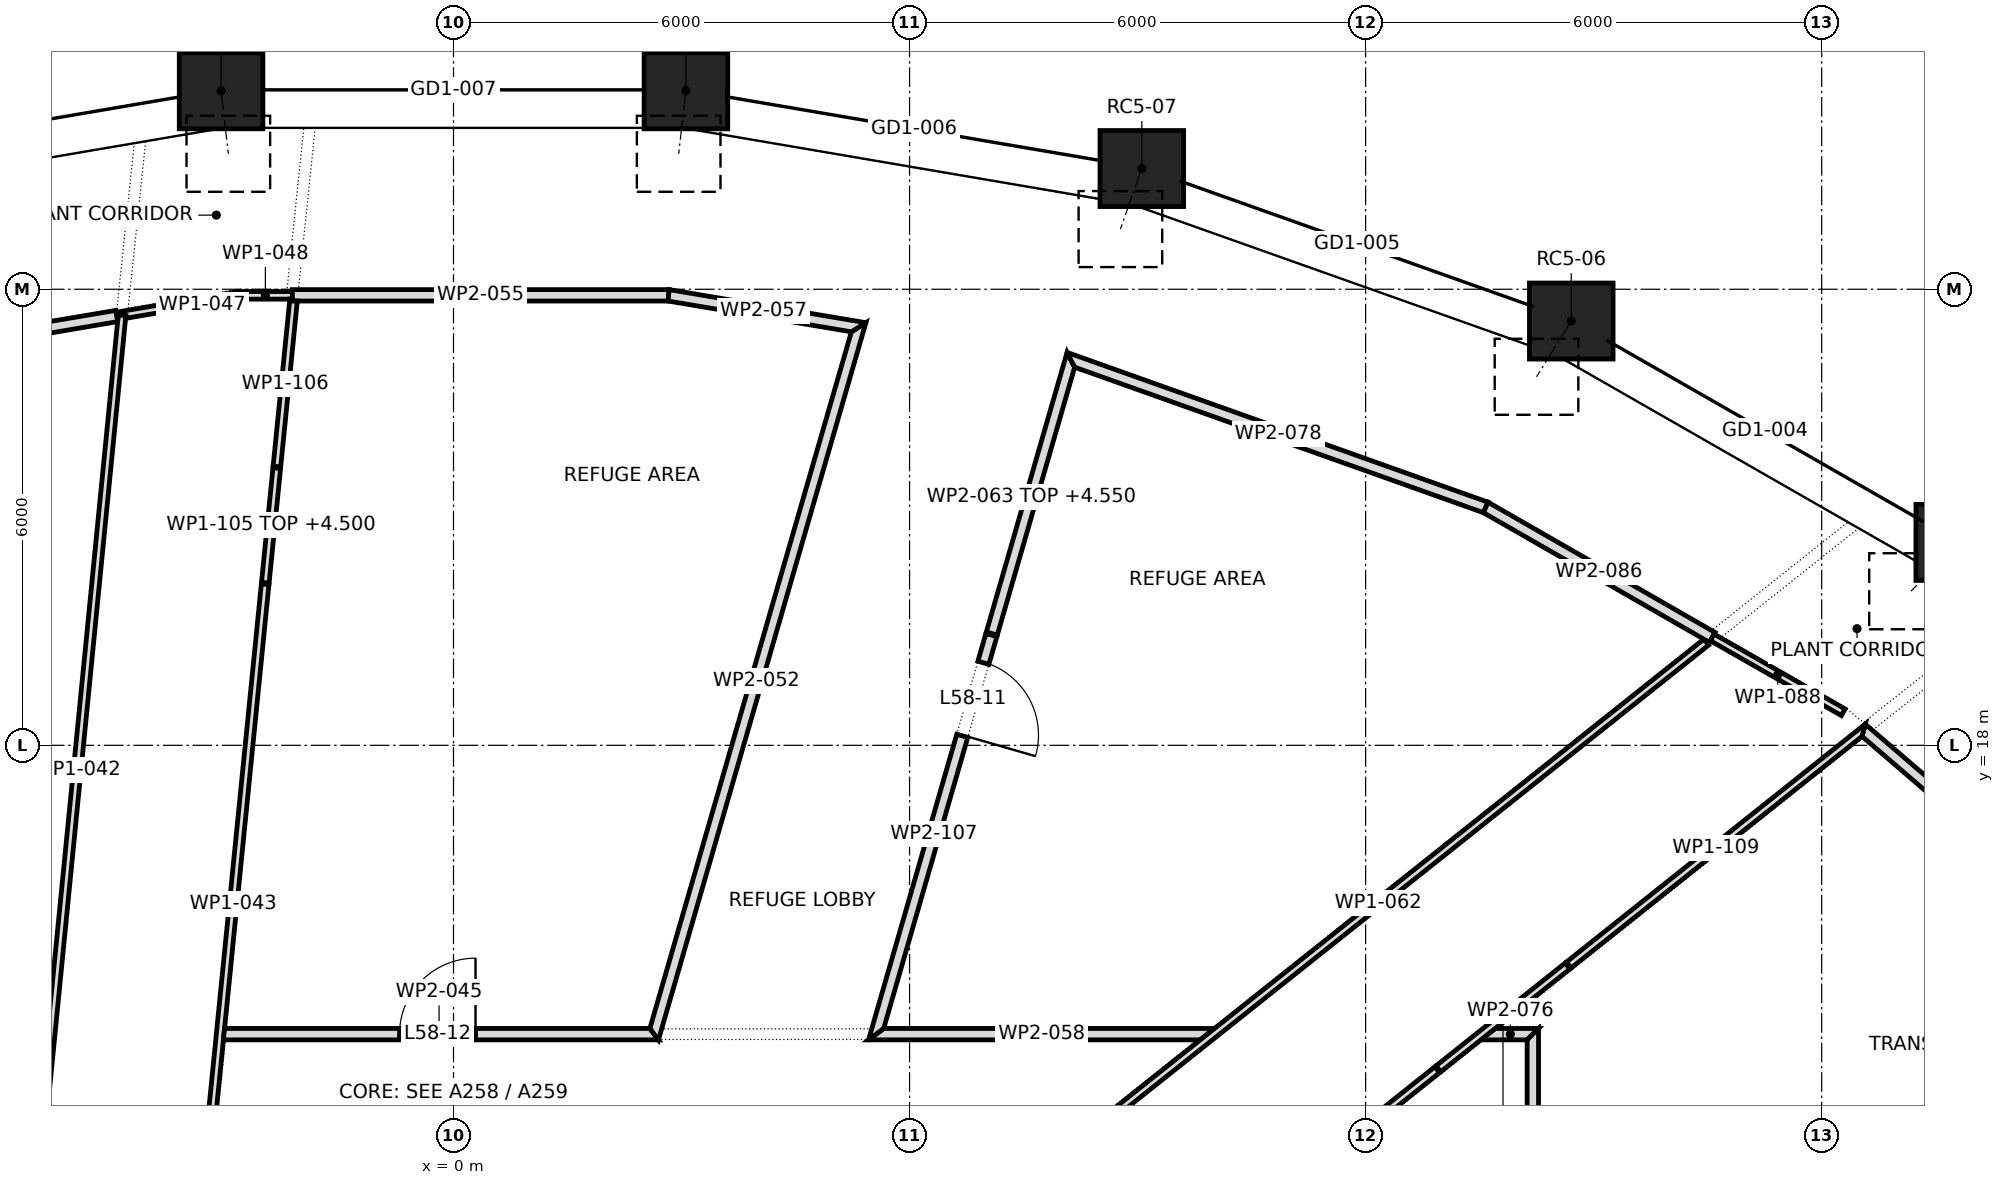
"""IFC4 building model, lengths in metres.
Left out: names, types, materials, properties, quantities, classifications, styles, units other than length and angle.
Written with IfcOpenShell. Run it as: python <this file> out.ifc"""

import sys

from ifc_helpers import new_model, si_unit, direction, frame, frame_2d, origin, origin_2d, place, context, subcontext, project, spatial, polyline, rectangle, outline, extrude, element, fill, save


model = new_model("IFC4")
c1 = context("Model", 3, precision=1e-05, world=origin(), true_north=direction((0.0, 1.0)))
c2 = subcontext(c1, "Body", "Model", "MODEL_VIEW")
j1 = project(units=[si_unit("LENGTHUNIT", "METRE"), si_unit("PLANEANGLEUNIT", "RADIAN")], contexts=[c1])
p1 = place(None, origin())
s1 = spatial("IfcSite", under=j1, at=p1, CompositionType="ELEMENT")
p2 = place(p1, origin())
s2 = spatial("IfcBuilding", under=s1, at=p2, CompositionType="ELEMENT")
p3 = place(p2, frame((0.0, 0.0, 250.9)))
s3 = spatial("IfcBuildingStorey", under=s2, at=p3, CompositionType="ELEMENT", Elevation=250.9)
p4 = place(p3, frame((19.79, 20.669, 0.083), z_axis=(-0.115812481815, -0.12096379157, 0.985877898213), x_axis=(0.722319686129, -0.691559304059, 0.0)))
e1 = element("IfcColumn", 1, at=p4, inside=s3, PredefinedType="COLUMN", context=c2, shape_type="SweptSolid", body=[
    extrude(rectangle(XDim=1.1, YDim=1.0, at=origin_2d()), origin(), (0.0, 0.0, 1.0), 5.308),
])
p5 = place(p3, frame((14.705, 23.582, 0.081), z_axis=(-0.086092626008, -0.138152910538, 0.986661964939), x_axis=(0.848695936688, -0.528881089707, 0.0)))
e2 = element("IfcColumn", 2, at=p5, inside=s3, PredefinedType="COLUMN", context=c2, shape_type="SweptSolid", body=[
    extrude(rectangle(XDim=1.1, YDim=1.0, at=origin_2d()), origin(), (0.0, 0.0, 1.0), 5.309),
])
p6 = place(p3, frame((9.056, 25.588, 0.079), z_axis=(-0.053067495482, -0.149959361151, 0.987266950184), x_axis=(0.942712482292, -0.333606318481, 0.0)))
e3 = element("IfcColumn", 3, at=p6, inside=s3, PredefinedType="COLUMN", context=c2, shape_type="SweptSolid", body=[
    extrude(rectangle(XDim=1.1, YDim=1.0, at=origin_2d()), origin(), (0.0, 0.0, 1.0), 5.309),
])
for number, where, z_axis, x_axis in (
    (4, (3.058, 26.611, 0.078), (-0.018, -0.156, 0.988), (0.993, -0.115, 0.0)),
    (5, (-3.058, 26.611, 0.078), (0.018, -0.156, 0.988), (0.993, 0.115, 0.0)),
):
    element("IfcColumn", number, at=place(p3, frame(where, z_axis=z_axis, x_axis=x_axis)), inside=s3, PredefinedType="COLUMN", context=c2, shape_type="SweptSolid", body=[
        extrude(rectangle(XDim=1.1, YDim=1.0, at=origin_2d()), origin(), (0.0, 0.0, 1.0), 5.309),
    ])
p7 = place(p3, frame((-8.386, 22.979, 0.0), z_axis=(0.0, 0.0, 1.0), x_axis=(0.986003200339, 0.166726389397, 0.0)))
e6 = element("IfcWall", 6, at=p7, inside=s3, PredefinedType="PARTITIONING", context=c2, shape_type="SweptSolid", body=[
    extrude(outline(polyline([(0.0, 0.075), (0.0, 0.074), (0.013, -0.075), (1.347, -0.075), (2.68, -0.075), (4.014, -0.075), (4.014, 0.075), (2.676, 0.075), (1.338, 0.075), (0.0, 0.075)])), origin(), (0.0, 0.0, 1.0), 5.1),
])
p8 = place(p7, frame((1.545, 0.0, 0.0)))
e7 = element("IfcOpeningElement", 7, at=p8, cuts=e6, PredefinedType="OPENING", context=c2, shape_type="SweptSolid", body=[
    extrude(rectangle(XDim=1.0, YDim=2.1, at=frame_2d((0.5, 1.05))), frame((0.0, 0.087, 0.0), z_axis=(0.0, -1.0, 0.0), x_axis=(1.0, 0.0, 0.0)), (0.0, 0.0, 1.0), 0.174),
])
p9 = place(p3, frame((-5.54, 11.7, 0.0), z_axis=(0.0, 0.0, 1.0), x_axis=(0.098192347243, 0.995167454725, 0.0)))
e8 = element("IfcWall", 8, at=p9, inside=s3, PredefinedType="PARTITIONING", context=c2, shape_type="SweptSolid", body=[
    extrude(rectangle(XDim=12.019, YDim=0.1, at=frame_2d((6.01, 0.0))), origin(), (0.0, 0.0, 1.0), 5.1),
])
p10 = place(p3, frame((-3.32, 11.7, 0.0), z_axis=(0.0, 0.0, 1.0), x_axis=(0.0995179867, 0.995035763339, 0.0)))
e9 = element("IfcWall", 9, at=p10, inside=s3, PredefinedType="PARTITIONING", context=c2, shape_type="SweptSolid", body=[
    extrude(outline(polyline([(0.0, -0.05), (1.295, -0.05), (2.59, -0.05), (2.593, -0.05), (2.593, -0.05), (4.552, -0.05), (6.512, -0.05), (8.471, -0.05), (8.471, 0.05), (6.777, 0.05), (5.083, 0.05), (3.388, 0.05), (1.694, 0.05), (0.0, 0.05), (0.0, -0.05)])), origin(), (0.0, 0.0, 1.0), 5.1),
])
p11 = place(p3, frame((-3.027, 14.2, 0.0), z_axis=(0.0, 0.0, 1.0), x_axis=(1.0, 0.0, 0.0)))
e10 = element("IfcWall", 10, at=p11, inside=s3, PredefinedType="PARTITIONING", context=c2, shape_type="SweptSolid", body=[
    extrude(outline(polyline([(5.723, -0.075), (5.723, -0.075), (5.667, 0.0), (5.611, 0.075), (3.745, 0.075), (1.88, 0.075), (0.015, 0.075), (0.0, -0.073), (0.0, -0.075), (1.908, -0.075), (3.816, -0.075), (5.723, -0.075)])), origin(), (0.0, 0.0, 1.0), 5.1),
])
p12 = place(p11, frame((2.317, 0.0, 0.0)))
e11 = element("IfcOpeningElement", 11, at=p12, cuts=e10, PredefinedType="OPENING", context=c2, shape_type="SweptSolid", body=[
    extrude(rectangle(XDim=1.0, YDim=2.1, at=frame_2d((0.5, 1.05))), frame((0.0, 0.087, 0.0), z_axis=(0.0, -1.0, 0.0), x_axis=(1.0, 0.0, 0.0)), (0.0, 0.0, 1.0), 0.174),
])
p13 = place(p3, frame((-2.826, 23.921, 0.0), z_axis=(0.0, 0.0, 1.0), x_axis=(-0.985865518692, -0.167538589746, 0.0)))
e12 = element("IfcWall", 12, at=p13, inside=s3, PredefinedType="PARTITIONING", context=c2, shape_type="SweptSolid", body=[
    extrude(outline(polyline([(1.626, 0.05), (1.622, 0.05), (1.604, -0.014), (1.508, 0.012), (1.518, 0.05), (0.009, 0.05), (0.009, 0.05), (0.009, 0.05), (0.004, 0.0), (0.0, -0.05), (1.626, -0.05), (1.626, 0.05)])), origin(), (0.0, 0.0, 1.0), 5.1),
])
p14 = place(p3, frame((-2.12, 23.92, 0.0), z_axis=(0.0, 0.0, 1.0), x_axis=(-1.0, 0.0, 0.0)))
e13 = element("IfcWall", 13, at=p14, inside=s3, PredefinedType="PARTITIONING", context=c2, shape_type="SweptSolid", body=[
    extrude(outline(polyline([(0.0, -0.05), (0.714, -0.05), (0.706, 0.05), (0.0, 0.05), (0.0, -0.05)])), origin(), (0.0, 0.0, 1.0), 5.1),
])
p15 = place(p3, frame((2.624, 14.146, 0.0), z_axis=(0.0, 0.0, 1.0), x_axis=(0.277874591474, 0.960617359521, 0.0)))
e14 = element("IfcWall", 14, at=p15, inside=s3, PredefinedType="PARTITIONING", context=c2, shape_type="SweptSolid", body=[
    extrude(outline(polyline([(9.822, -0.075), (9.822, -0.075), (9.654, 0.075), (7.746, 0.075), (5.837, 0.075), (3.929, 0.075), (2.021, 0.075), (0.113, 0.075), (0.0, -0.075), (1.965, -0.075), (3.929, -0.075), (5.893, -0.075), (7.857, -0.075), (9.822, -0.075)])), origin(), (0.0, 0.0, 1.0), 5.1),
])
p16 = place(p3, frame((2.836, 23.92, 0.0), z_axis=(0.0, 0.0, 1.0), x_axis=(-1.0, 0.0, 0.0)))
e15 = element("IfcWall", 15, at=p16, inside=s3, PredefinedType="PARTITIONING", context=c2, shape_type="SweptSolid", body=[
    extrude(outline(polyline([(4.956, 0.075), (3.308, 0.075), (1.66, 0.075), (0.012, 0.075), (0.0, -0.074), (0.0, -0.075), (1.652, -0.075), (3.304, -0.075), (4.956, -0.075), (4.956, 0.075)])), origin(), (0.0, 0.0, 1.0), 5.1),
])
p17 = place(p3, frame((5.413, 23.486, 0.0), z_axis=(0.0, 0.0, 1.0), x_axis=(-0.986192138968, 0.165605147982, 0.0)))
e16 = element("IfcWall", 16, at=p17, inside=s3, PredefinedType="PARTITIONING", context=c2, shape_type="SweptSolid", body=[
    extrude(outline(polyline([(2.625, -0.075), (2.625, -0.075), (2.613, 0.075), (0.168, 0.075), (0.0, -0.075), (1.313, -0.075), (2.625, -0.075)])), origin(), (0.0, 0.0, 1.0), 5.1),
])
p18 = place(p3, frame((5.46, 14.2, 0.0), z_axis=(0.0, 0.0, 1.0), x_axis=(1.0, 0.0, 0.0)))
e17 = element("IfcWall", 17, at=p18, inside=s3, PredefinedType="PARTITIONING", context=c2, shape_type="SweptSolid", body=[
    extrude(outline(polyline([(0.0, -0.075), (1.455, -0.075), (2.91, -0.075), (4.365, -0.075), (4.553, 0.075), (3.102, 0.075), (1.651, 0.075), (0.199, 0.075), (0.1, 0.0), (0.0, -0.075)])), origin(), (0.0, 0.0, 1.0), 5.1),
])
p19 = place(p3, frame((7.811, 12.459, 0.0), z_axis=(0.0, 0.0, 1.0), x_axis=(0.782532006264, 0.622610359031, 0.0)))
e18 = element("IfcWall", 18, at=p19, inside=s3, PredefinedType="PARTITIONING", context=c2, shape_type="SweptSolid", body=[
    extrude(outline(polyline([(11.08, 0.05), (9.234, 0.05), (7.387, 0.05), (5.54, 0.05), (3.694, 0.05), (1.847, 0.05), (0.0, 0.05), (0.1, -0.05), (1.93, -0.05), (3.76, -0.05), (5.59, -0.05), (7.42, -0.05), (9.25, -0.05), (11.08, -0.05), (11.08, 0.05)])), origin(), (0.0, 0.0, 1.0), 5.1),
])
p20 = place(p3, frame((8.144, 23.148, 0.0), z_axis=(0.0, 0.0, 1.0), x_axis=(-0.277458764532, -0.96073754688, 0.0)))
e19 = element("IfcWall", 19, at=p20, inside=s3, PredefinedType="PARTITIONING", context=c2, shape_type="SweptSolid", body=[
    extrude(outline(polyline([(3.838, 0.075), (1.999, 0.075), (0.159, 0.075), (0.0, -0.075), (1.919, -0.075), (3.838, -0.075), (3.838, 0.075)])), origin(), (0.0, 0.0, 1.0), 4.55),
])
p21 = place(p3, frame((10.39, 11.7, 0.0), z_axis=(0.0, 0.0, 1.0), x_axis=(0.782322562036, 0.622873509574, 0.0)))
e20 = element("IfcWall", 20, at=p21, inside=s3, PredefinedType="PARTITIONING", context=c2, shape_type="SweptSolid", body=[
    extrude(outline(polyline([(0.0, 0.05), (0.0, -0.05), (1.636, -0.05), (3.272, -0.05), (3.272, 0.05), (1.636, 0.05), (0.0, 0.05)])), origin(), (0.0, 0.0, 1.0), 5.1),
])
p22 = place(p3, frame((13.516, 14.2, 0.0), z_axis=(0.0, 0.0, 1.0), x_axis=(1.0, 0.0, 0.0)))
e21 = element("IfcWall", 21, at=p22, inside=s3, PredefinedType="PARTITIONING", context=c2, shape_type="SweptSolid", body=[
    extrude(outline(polyline([(0.0, -0.075), (0.609, -0.075), (0.759, 0.075), (0.188, 0.075), (0.0, -0.075), (0.0, -0.075)])), origin(), (0.0, 0.0, 1.0), 5.1),
])
p23 = place(p3, frame((13.586, 21.128, 0.0), z_axis=(0.0, 0.0, 1.0), x_axis=(-0.942147093133, 0.335199723897, 0.0)))
e22 = element("IfcWall", 22, at=p23, inside=s3, PredefinedType="PARTITIONING", context=c2, shape_type="SweptSolid", body=[
    extrude(outline(polyline([(5.879, -0.075), (5.879, -0.075), (5.72, 0.075), (3.818, 0.075), (1.916, 0.075), (0.013, 0.075), (0.0, -0.073), (0.0, -0.075), (1.96, -0.075), (3.919, -0.075), (5.879, -0.075)])), origin(), (0.0, 0.0, 1.0), 5.1),
])
p24 = place(p3, frame((14.091, 8.665, 0.0), z_axis=(0.0, 0.0, 1.0), x_axis=(0.892879606884, 0.45029546701, 0.0)))
e23 = element("IfcWall", 23, at=p24, inside=s3, PredefinedType="PARTITIONING", context=c2, shape_type="SweptSolid", body=[
    extrude(outline(polyline([(10.606, -0.075), (10.606, -0.075), (10.424, 0.075), (8.727, 0.075), (7.031, 0.075), (5.334, 0.075), (3.637, 0.075), (1.94, 0.075), (0.243, 0.075), (0.0, -0.075), (0.0, -0.075), (1.768, -0.075), (3.535, -0.075), (5.303, -0.075), (7.071, -0.075), (8.838, -0.075), (10.606, -0.075)])), origin(), (0.0, 0.0, 1.0), 5.1),
])
p25 = place(p3, frame((14.2, 14.275, 0.0), z_axis=(0.0, 0.0, 1.0), x_axis=(0.0, -1.0, 0.0)))
e24 = element("IfcWall", 24, at=p25, inside=s3, PredefinedType="PARTITIONING", context=c2, shape_type="SweptSolid", body=[
    extrude(outline(polyline([(0.15, -0.075), (1.992, -0.075), (3.834, -0.075), (5.677, -0.075), (5.433, 0.075), (3.622, 0.075), (1.811, 0.075), (0.0, 0.075), (0.15, -0.075)])), origin(), (0.0, 0.0, 1.0), 5.1),
])
p26 = place(p25, frame((2.315, 0.0, 0.0)))
e25 = element("IfcOpeningElement", 25, at=p26, cuts=e24, PredefinedType="OPENING", context=c2, shape_type="SweptSolid", body=[
    extrude(rectangle(XDim=1.0, YDim=2.1, at=frame_2d((0.5, 1.05))), frame((0.0, 0.087, 0.0), z_axis=(0.0, -1.0, 0.0), x_axis=(1.0, 0.0, 0.0)), (0.0, 0.0, 1.0), 0.174),
])
p27 = place(p3, frame((16.56, 19.42, 0.0), z_axis=(0.0, 0.0, 1.0), x_axis=(-0.867342678507, 0.497711440536, 0.0)))
e26 = element("IfcWall", 26, at=p27, inside=s3, PredefinedType="PARTITIONING", context=c2, shape_type="SweptSolid", body=[
    extrude(outline(polyline([(0.0, -0.075), (1.721, -0.075), (3.443, -0.075), (3.429, 0.075), (1.715, 0.075), (0.0, 0.075), (0.0, -0.075)])), origin(), (0.0, 0.0, 1.0), 5.1),
])
p28 = place(p3, frame((18.283, 18.435, 0.0), z_axis=(0.0, 0.0, 1.0), x_axis=(-0.868280986798, 0.496072704314, 0.0)))
e27 = element("IfcWall", 27, at=p28, inside=s3, PredefinedType="PARTITIONING", context=c2, shape_type="SweptSolid", body=[
    extrude(rectangle(XDim=1.985, YDim=0.1, at=frame_2d((0.992, 0.0))), origin(), (0.0, 0.0, 1.0), 5.1),
])
p29 = place(p3, frame((22.166, 15.095, 0.0), z_axis=(0.0, 0.0, 1.0), x_axis=(-0.758681846791, 0.651461322989, 0.0)))
e28 = element("IfcWall", 28, at=p29, inside=s3, PredefinedType="PARTITIONING", context=c2, shape_type="SweptSolid", body=[
    extrude(outline(polyline([(4.8, -0.075), (4.8, -0.075), (4.727, 0.075), (3.156, 0.075), (1.586, 0.075), (0.015, 0.075), (0.0, -0.074), (0.0, -0.075), (1.6, -0.075), (3.2, -0.075), (4.8, -0.075)])), origin(), (0.0, 0.0, 1.0), 5.1),
])
p30 = place(p3, frame((-2.477, 20.129, 0.0), z_axis=(0.0, 0.0, 1.0), x_axis=(0.099535204501, 0.995034041159, 0.0)))
e29 = element("IfcWall", 29, at=p30, inside=s3, PredefinedType="PARTITIONING", context=c2, shape_type="SweptSolid", body=[
    extrude(outline(polyline([(0.0, 0.05), (0.0, -0.05), (1.535, -0.05), (1.535, 0.05), (0.0, 0.05)])), origin(), (0.0, 0.0, 1.0), 4.5),
])
p31 = place(p3, frame((-2.324, 21.657, 0.0), z_axis=(0.0, 0.0, 1.0), x_axis=(0.099471035503, 0.99504045802, 0.0)))
e30 = element("IfcWall", 30, at=p31, inside=s3, PredefinedType="PARTITIONING", context=c2, shape_type="SweptSolid", body=[
    extrude(outline(polyline([(0.0, -0.05), (2.204, -0.05), (2.198, 0.014), (2.219, 0.017), (2.219, 0.05), (0.0, 0.05), (0.0, -0.05)])), origin(), (0.0, 0.0, 1.0), 5.1),
])
p32 = place(p3, frame((7.079, 19.461, 0.0), z_axis=(0.0, 0.0, 1.0), x_axis=(-0.277490255222, -0.960728451883, 0.0)))
e31 = element("IfcWall", 31, at=p32, inside=s3, PredefinedType="PARTITIONING", context=c2, shape_type="SweptSolid", body=[
    extrude(outline(polyline([(5.575, -0.075), (5.575, -0.075), (5.376, 0.075), (3.584, 0.075), (1.792, 0.075), (0.0, 0.075), (0.0, -0.075), (1.858, -0.075), (3.717, -0.075), (5.575, -0.075)])), origin(), (0.0, 0.0, 1.0), 5.1),
])
p33 = place(p32, frame((0.38, 0.0, 0.0)))
e32 = element("IfcOpeningElement", 32, at=p33, cuts=e31, PredefinedType="OPENING", context=c2, shape_type="SweptSolid", body=[
    extrude(rectangle(XDim=1.0, YDim=2.1, at=frame_2d((0.5, 1.05))), frame((0.0, 0.087, 0.0), z_axis=(0.0, -1.0, 0.0), x_axis=(1.0, 0.0, 0.0)), (0.0, 0.0, 1.0), 0.174),
])
p34 = place(p3, frame((12.95, 13.738, 0.0), z_axis=(0.0, 0.0, 1.0), x_axis=(0.782333404853, 0.622859890867, 0.0)))
e33 = element("IfcWall", 33, at=p34, inside=s3, PredefinedType="PARTITIONING", context=c2, shape_type="SweptSolid", body=[
    extrude(outline(polyline([(0.0, 0.05), (0.0, -0.05), (2.192, -0.05), (2.192, 0.05), (0.0, 0.05)])), origin(), (0.0, 0.0, 1.0), 4.65),
])
p35 = place(p3, frame((14.665, 15.104, 0.0), z_axis=(0.0, 0.0, 1.0), x_axis=(0.7823282695, 0.622866340993, 0.0)))
e34 = element("IfcWall", 34, at=p35, inside=s3, PredefinedType="PARTITIONING", context=c2, shape_type="SweptSolid", body=[
    extrude(outline(polyline([(0.0, -0.05), (1.634, -0.05), (3.268, -0.05), (4.902, -0.05), (5.036, 0.05), (3.357, 0.05), (1.678, 0.05), (0.0, 0.05), (0.0, -0.05)])), origin(), (0.0, 0.0, 1.0), 5.1),
])
p36 = place(p33, origin())
e35 = element("IfcDoor", 35, at=p36, inside=s3, OperationType="SINGLE_SWING_LEFT", PredefinedType="DOOR", context=c2, shape_type="SweptSolid", body=[
    extrude(rectangle(XDim=1.0, YDim=2.1, at=frame_2d((0.5, 1.05))), frame((0.0, 0.025, 0.0), z_axis=(0.0, -1.0, 0.0), x_axis=(1.0, 0.0, 0.0)), (0.0, 0.0, 1.0), 0.05),
])
fill(e32, e35)
p37 = place(p12, origin())
e36 = element("IfcDoor", 36, at=p37, inside=s3, OperationType="SINGLE_SWING_LEFT", PredefinedType="DOOR", context=c2, shape_type="SweptSolid", body=[
    extrude(rectangle(XDim=1.0, YDim=2.1, at=frame_2d((0.5, 1.05))), frame((0.0, 0.025, 0.0), z_axis=(0.0, -1.0, 0.0), x_axis=(1.0, 0.0, 0.0)), (0.0, 0.0, 1.0), 0.05),
])
fill(e11, e36)
save(model, sys.argv[1])
